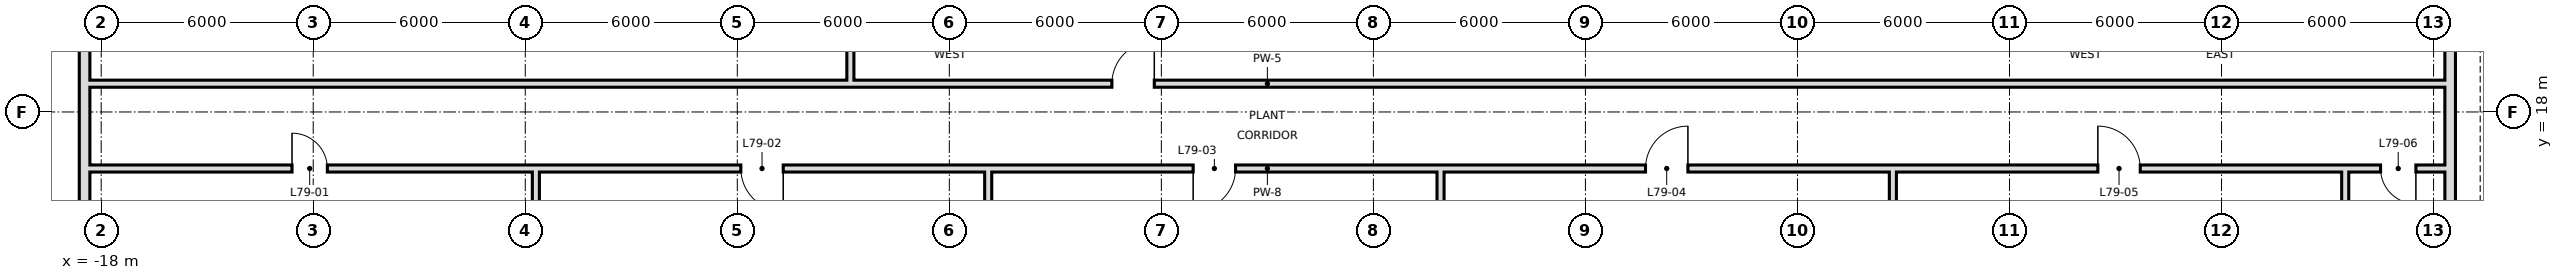
"""IFC4 building model, lengths in metres.
Left out: names, types, materials, properties, quantities, classifications, styles, units other than length and angle.
Written with IfcOpenShell. Run it as: python <this file> out.ifc"""

import sys

from ifc_helpers import new_model, si_unit, direction, frame, frame_2d, origin, place, context, subcontext, project, spatial, rectangle, extrude, element, fill, save


model = new_model("IFC4")
c1 = context("Model", 3, precision=1e-05, world=origin(), true_north=direction((0.0, 1.0)))
c2 = subcontext(c1, "Body", "Model", "MODEL_VIEW")
j1 = project(units=[si_unit("LENGTHUNIT", "METRE"), si_unit("PLANEANGLEUNIT", "RADIAN")], contexts=[c1])
p1 = place(None, origin())
s1 = spatial("IfcSite", under=j1, at=p1, CompositionType="ELEMENT")
p2 = place(p1, origin())
s2 = spatial("IfcBuilding", under=s1, at=p2, CompositionType="ELEMENT")
p3 = place(p2, frame((0.0, 0.0, 331.2)))
s3 = spatial("IfcBuildingStorey", under=s2, at=p3, CompositionType="ELEMENT", Elevation=331.2)
p4 = place(p3, frame((48.47, 11.805, 0.0), z_axis=(0.0, 0.0, 1.0), x_axis=(0.0, 1.0, 0.0)))
e1 = element("IfcWall", 1, at=p4, inside=s3, PredefinedType="SOLIDWALL", context=c2, shape_type="SweptSolid", body=[
    extrude(rectangle(XDim=36.665, YDim=0.3, at=frame_2d((18.332, 0.0))), origin(), (0.0, 0.0, 1.0), 6.35),
])
p5 = place(p4, frame((0.47, 0.0, 0.9)))
e2 = element("IfcOpeningElement", 2, at=p5, cuts=e1, PredefinedType="OPENING", context=c2, shape_type="SweptSolid", body=[
    extrude(rectangle(XDim=1.8, YDim=1.5, at=frame_2d((0.9, 0.75))), frame((0.0, 0.16, 0.0), z_axis=(0.0, -1.0, 0.0), x_axis=(1.0, 0.0, 0.0)), (0.0, 0.0, 1.0), 0.32),
])
p6 = place(p4, frame((14.295, 0.0, 0.9)))
e3 = element("IfcOpeningElement", 3, at=p6, cuts=e1, PredefinedType="OPENING", context=c2, shape_type="SweptSolid", body=[
    extrude(rectangle(XDim=1.8, YDim=1.5, at=frame_2d((0.9, 0.75))), frame((0.0, 0.16, 0.0), z_axis=(0.0, -1.0, 0.0), x_axis=(1.0, 0.0, 0.0)), (0.0, 0.0, 1.0), 0.32),
])
p7 = place(p4, frame((26.295, 0.0, 0.9)))
e4 = element("IfcOpeningElement", 4, at=p7, cuts=e1, PredefinedType="OPENING", context=c2, shape_type="SweptSolid", body=[
    extrude(rectangle(XDim=1.8, YDim=1.5, at=frame_2d((0.9, 0.75))), frame((0.0, 0.16, 0.0), z_axis=(0.0, -1.0, 0.0), x_axis=(1.0, 0.0, 0.0)), (0.0, 0.0, 1.0), 0.32),
])
p8 = place(p3, frame((-18.47, 48.47, 0.0), z_axis=(0.0, 0.0, 1.0), x_axis=(0.0, -1.0, 0.0)))
e5 = element("IfcWall", 5, at=p8, inside=s3, PredefinedType="SOLIDWALL", context=c2, shape_type="SweptSolid", body=[
    extrude(rectangle(XDim=36.665, YDim=0.3, at=frame_2d((18.332, 0.0))), origin(), (0.0, 0.0, 1.0), 6.35),
])
p9 = place(p8, frame((2.27, 0.0, 0.9)))
e6 = element("IfcOpeningElement", 6, at=p9, cuts=e5, PredefinedType="OPENING", context=c2, shape_type="SweptSolid", body=[
    extrude(rectangle(XDim=1.8, YDim=1.5, at=frame_2d((0.9, 0.75))), frame((0.0, 0.16, 0.0), z_axis=(0.0, -1.0, 0.0), x_axis=(1.0, 0.0, 0.0)), (0.0, 0.0, 1.0), 0.32),
])
p10 = place(p8, frame((14.57, 0.0, 0.9)))
e7 = element("IfcOpeningElement", 7, at=p10, cuts=e5, PredefinedType="OPENING", context=c2, shape_type="SweptSolid", body=[
    extrude(rectangle(XDim=1.8, YDim=1.5, at=frame_2d((0.9, 0.75))), frame((0.0, 0.16, 0.0), z_axis=(0.0, -1.0, 0.0), x_axis=(1.0, 0.0, 0.0)), (0.0, 0.0, 1.0), 0.32),
])
p11 = place(p8, frame((26.57, 0.0, 0.9)))
e8 = element("IfcOpeningElement", 8, at=p11, cuts=e5, PredefinedType="OPENING", context=c2, shape_type="SweptSolid", body=[
    extrude(rectangle(XDim=1.8, YDim=1.5, at=frame_2d((0.9, 0.75))), frame((0.0, 0.16, 0.0), z_axis=(0.0, -1.0, 0.0), x_axis=(1.0, 0.0, 0.0)), (0.0, 0.0, 1.0), 0.32),
])
p12 = place(p3, frame((-5.7, 5.5, 0.0), z_axis=(0.0, 0.0, 1.0), x_axis=(0.0, 1.0, 0.0)))
e9 = element("IfcWall", 9, at=p12, inside=s3, PredefinedType="SOLIDWALL", context=c2, shape_type="SweptSolid", body=[
    extrude(rectangle(XDim=10.8, YDim=0.2, at=frame_2d((5.4, 0.0))), origin(), (0.0, 0.0, 1.0), 5.65),
])
p13 = place(p3, frame((3.2, 18.9, 0.0), z_axis=(0.0, 0.0, 1.0), x_axis=(0.0, 1.0, 0.0)))
e10 = element("IfcWall", 10, at=p13, inside=s3, PredefinedType="SOLIDWALL", context=c2, shape_type="SweptSolid", body=[
    extrude(rectangle(XDim=29.6, YDim=0.2, at=frame_2d((14.8, 0.0))), origin(), (0.0, 0.0, 1.0), 5.65),
])
p14 = place(p13, frame((18.3, 0.0, 0.0)))
e11 = element("IfcOpeningElement", 11, at=p14, cuts=e10, PredefinedType="OPENING", context=c2, shape_type="SweptSolid", body=[
    extrude(rectangle(XDim=1.2, YDim=2.4, at=frame_2d((0.6, 1.2))), frame((0.0, 0.11, 0.0), z_axis=(0.0, -1.0, 0.0), x_axis=(1.0, 0.0, 0.0)), (0.0, 0.0, 1.0), 0.22),
])
for number, where, z_axis, x_axis in (
    (12, (7.1, 5.5, 0.0), (0.0, 0.0, 1.0), (0.0, 1.0, 0.0)),
    (13, (19.9, 5.5, 0.0), (0.0, 0.0, 1.0), (0.0, 1.0, 0.0)),
    (14, (32.7, 5.5, 0.0), (0.0, 0.0, 1.0), (0.0, 1.0, 0.0)),
):
    element("IfcWall", number, at=place(p3, frame(where, z_axis=z_axis, x_axis=x_axis)), inside=s3, PredefinedType="SOLIDWALL", context=c2, shape_type="SweptSolid", body=[
        extrude(rectangle(XDim=10.8, YDim=0.2, at=frame_2d((5.4, 0.0))), origin(), (0.0, 0.0, 1.0), 5.65),
    ])
p15 = place(p3, frame((45.5, 8.793, 0.0), z_axis=(0.0, 0.0, 1.0), x_axis=(0.0, 1.0, 0.0)))
e15 = element("IfcWall", 15, at=p15, inside=s3, PredefinedType="SOLIDWALL", context=c2, shape_type="SweptSolid", body=[
    extrude(rectangle(XDim=7.507, YDim=0.2, at=frame_2d((3.753, 0.0))), origin(), (0.0, 0.0, 1.0), 5.65),
])
p16 = place(p3, frame((-18.5, 16.4, 0.0), z_axis=(0.0, 0.0, 1.0), x_axis=(1.0, 0.0, 0.0)))
e16 = element("IfcWall", 16, at=p16, inside=s3, PredefinedType="SOLIDWALL", context=c2, shape_type="SweptSolid", body=[
    extrude(rectangle(XDim=67.0, YDim=0.2, at=frame_2d((33.5, 0.0))), origin(), (0.0, 0.0, 1.0), 5.65),
])
p17 = place(p16, frame((5.9, 0.0, 0.0)))
e17 = element("IfcOpeningElement", 17, at=p17, cuts=e16, PredefinedType="OPENING", context=c2, shape_type="SweptSolid", body=[
    extrude(rectangle(XDim=1.0, YDim=2.4, at=frame_2d((0.5, 1.2))), frame((0.0, 0.11, 0.0), z_axis=(0.0, -1.0, 0.0), x_axis=(1.0, 0.0, 0.0)), (0.0, 0.0, 1.0), 0.22),
])
p18 = place(p16, frame((18.6, 0.0, 0.0)))
e18 = element("IfcOpeningElement", 18, at=p18, cuts=e16, PredefinedType="OPENING", context=c2, shape_type="SweptSolid", body=[
    extrude(rectangle(XDim=1.2, YDim=2.4, at=frame_2d((0.6, 1.2))), frame((0.0, 0.11, 0.0), z_axis=(0.0, -1.0, 0.0), x_axis=(1.0, 0.0, 0.0)), (0.0, 0.0, 1.0), 0.22),
])
p19 = place(p16, frame((31.4, 0.0, 0.0)))
e19 = element("IfcOpeningElement", 19, at=p19, cuts=e16, PredefinedType="OPENING", context=c2, shape_type="SweptSolid", body=[
    extrude(rectangle(XDim=1.2, YDim=2.4, at=frame_2d((0.6, 1.2))), frame((0.0, 0.11, 0.0), z_axis=(0.0, -1.0, 0.0), x_axis=(1.0, 0.0, 0.0)), (0.0, 0.0, 1.0), 0.22),
])
p20 = place(p16, frame((44.2, 0.0, 0.0)))
e20 = element("IfcOpeningElement", 20, at=p20, cuts=e16, PredefinedType="OPENING", context=c2, shape_type="SweptSolid", body=[
    extrude(rectangle(XDim=1.2, YDim=2.4, at=frame_2d((0.6, 1.2))), frame((0.0, 0.11, 0.0), z_axis=(0.0, -1.0, 0.0), x_axis=(1.0, 0.0, 0.0)), (0.0, 0.0, 1.0), 0.22),
])
p21 = place(p16, frame((57.0, 0.0, 0.0)))
e21 = element("IfcOpeningElement", 21, at=p21, cuts=e16, PredefinedType="OPENING", context=c2, shape_type="SweptSolid", body=[
    extrude(rectangle(XDim=1.2, YDim=2.4, at=frame_2d((0.6, 1.2))), frame((0.0, 0.11, 0.0), z_axis=(0.0, -1.0, 0.0), x_axis=(1.0, 0.0, 0.0)), (0.0, 0.0, 1.0), 0.22),
])
p22 = place(p16, frame((65.0, 0.0, 0.0)))
e22 = element("IfcOpeningElement", 22, at=p22, cuts=e16, PredefinedType="OPENING", context=c2, shape_type="SweptSolid", body=[
    extrude(rectangle(XDim=1.0, YDim=2.4, at=frame_2d((0.5, 1.2))), frame((0.0, 0.11, 0.0), z_axis=(0.0, -1.0, 0.0), x_axis=(1.0, 0.0, 0.0)), (0.0, 0.0, 1.0), 0.22),
])
p23 = place(p3, frame((-18.5, 18.8, 0.0), z_axis=(0.0, 0.0, 1.0), x_axis=(1.0, 0.0, 0.0)))
e23 = element("IfcWall", 23, at=p23, inside=s3, PredefinedType="SOLIDWALL", context=c2, shape_type="SweptSolid", body=[
    extrude(rectangle(XDim=67.0, YDim=0.2, at=frame_2d((33.5, 0.0))), origin(), (0.0, 0.0, 1.0), 5.65),
])
p24 = place(p23, frame((29.1, 0.0, 0.0)))
e24 = element("IfcOpeningElement", 24, at=p24, cuts=e23, PredefinedType="OPENING", context=c2, shape_type="SweptSolid", body=[
    extrude(rectangle(XDim=1.2, YDim=2.4, at=frame_2d((0.6, 1.2))), frame((0.0, 0.11, 0.0), z_axis=(0.0, -1.0, 0.0), x_axis=(1.0, 0.0, 0.0)), (0.0, 0.0, 1.0), 0.22),
])
p25 = place(p17, origin())
e25 = element("IfcDoor", 25, at=p25, inside=s3, OperationType="SINGLE_SWING_LEFT", PredefinedType="DOOR", context=c2, shape_type="SweptSolid", body=[
    extrude(rectangle(XDim=1.0, YDim=2.4, at=frame_2d((0.5, 1.2))), frame((0.0, 0.025, 0.0), z_axis=(0.0, -1.0, 0.0), x_axis=(1.0, 0.0, 0.0)), (0.0, 0.0, 1.0), 0.05),
])
fill(e17, e25)
p26 = place(p18, origin())
e26 = element("IfcDoor", 26, at=p26, inside=s3, OperationType="SINGLE_SWING_RIGHT", PredefinedType="DOOR", context=c2, shape_type="SweptSolid", body=[
    extrude(rectangle(XDim=1.2, YDim=2.4, at=frame_2d((0.6, 1.2))), frame((0.0, 0.025, 0.0), z_axis=(0.0, -1.0, 0.0), x_axis=(1.0, 0.0, 0.0)), (0.0, 0.0, 1.0), 0.05),
])
fill(e18, e26)
p27 = place(p19, frame((1.2, 0.0, 0.0), z_axis=(0.0, 0.0, 1.0), x_axis=(-1.0, 0.0, 0.0)))
e27 = element("IfcDoor", 27, at=p27, inside=s3, OperationType="SINGLE_SWING_RIGHT", PredefinedType="DOOR", context=c2, shape_type="SweptSolid", body=[
    extrude(rectangle(XDim=1.2, YDim=2.4, at=frame_2d((0.6, 1.2))), frame((0.0, 0.025, 0.0), z_axis=(0.0, -1.0, 0.0), x_axis=(1.0, 0.0, 0.0)), (0.0, 0.0, 1.0), 0.05),
])
fill(e19, e27)
p28 = place(p20, frame((1.2, 0.0, 0.0), z_axis=(0.0, 0.0, 1.0), x_axis=(-1.0, 0.0, 0.0)))
e28 = element("IfcDoor", 28, at=p28, inside=s3, OperationType="SINGLE_SWING_LEFT", PredefinedType="DOOR", context=c2, shape_type="SweptSolid", body=[
    extrude(rectangle(XDim=1.2, YDim=2.4, at=frame_2d((0.6, 1.2))), frame((0.0, 0.025, 0.0), z_axis=(0.0, -1.0, 0.0), x_axis=(1.0, 0.0, 0.0)), (0.0, 0.0, 1.0), 0.05),
])
fill(e20, e28)
p29 = place(p21, origin())
e29 = element("IfcDoor", 29, at=p29, inside=s3, OperationType="SINGLE_SWING_LEFT", PredefinedType="DOOR", context=c2, shape_type="SweptSolid", body=[
    extrude(rectangle(XDim=1.2, YDim=2.4, at=frame_2d((0.6, 1.2))), frame((0.0, 0.025, 0.0), z_axis=(0.0, -1.0, 0.0), x_axis=(1.0, 0.0, 0.0)), (0.0, 0.0, 1.0), 0.05),
])
fill(e21, e29)
p30 = place(p22, origin())
e30 = element("IfcDoor", 30, at=p30, inside=s3, OperationType="SINGLE_SWING_RIGHT", PredefinedType="DOOR", context=c2, shape_type="SweptSolid", body=[
    extrude(rectangle(XDim=1.0, YDim=2.4, at=frame_2d((0.5, 1.2))), frame((0.0, 0.025, 0.0), z_axis=(0.0, -1.0, 0.0), x_axis=(1.0, 0.0, 0.0)), (0.0, 0.0, 1.0), 0.05),
])
fill(e22, e30)
p31 = place(p24, frame((1.2, 0.0, 0.0), z_axis=(0.0, 0.0, 1.0), x_axis=(-1.0, 0.0, 0.0)))
e31 = element("IfcDoor", 31, at=p31, inside=s3, OperationType="SINGLE_SWING_LEFT", PredefinedType="DOOR", context=c2, shape_type="SweptSolid", body=[
    extrude(rectangle(XDim=1.2, YDim=2.4, at=frame_2d((0.6, 1.2))), frame((0.0, 0.025, 0.0), z_axis=(0.0, -1.0, 0.0), x_axis=(1.0, 0.0, 0.0)), (0.0, 0.0, 1.0), 0.05),
])
fill(e24, e31)
save(model, sys.argv[1])
